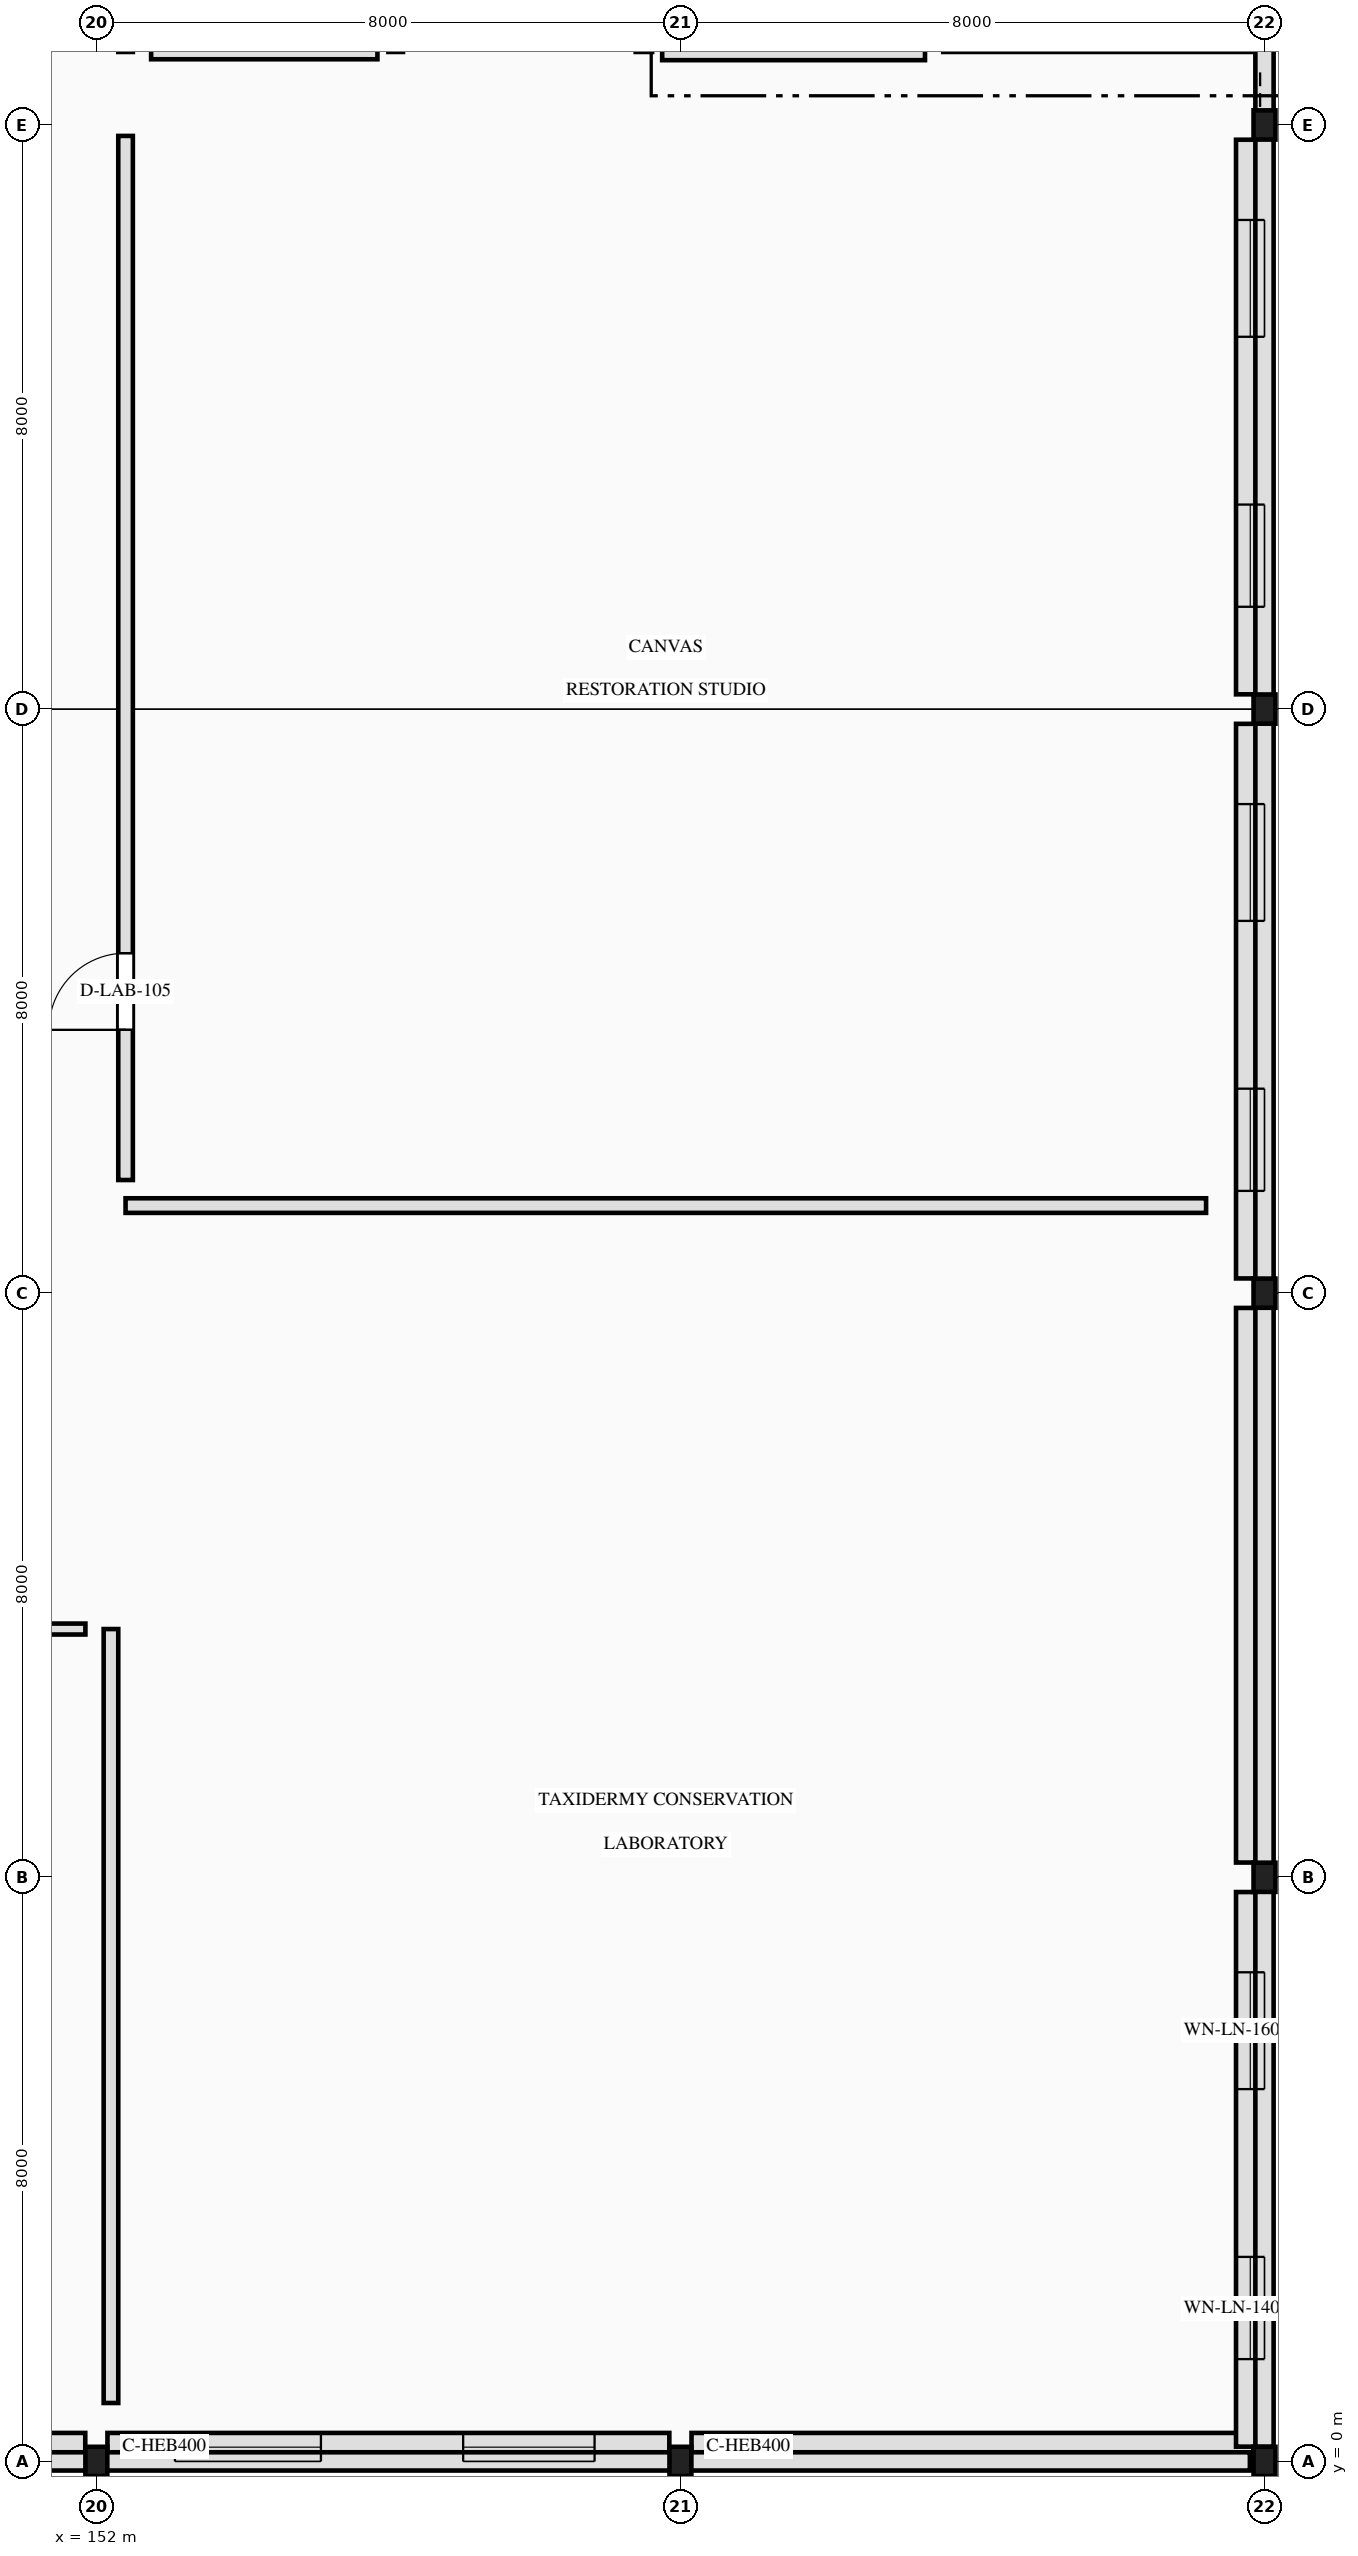
"""IFC4 building model, lengths in metres.
Left out: names, types, materials, properties, quantities, classifications, styles, units other than length and angle.
Written with IfcOpenShell. Run it as: python <this file> out.ifc"""

import sys

from ifc_helpers import new_model, si_unit, direction, frame, frame_2d, origin, origin_2d, place, context, subcontext, project, spatial, rectangle, i_section, extrude, element, fill, save


model = new_model("IFC4")
c1 = context("Model", 3, precision=1e-05, world=origin(), true_north=direction((0.0, 1.0)))
c2 = subcontext(c1, "Body", "Model", "MODEL_VIEW")
j1 = project(units=[si_unit("LENGTHUNIT", "METRE"), si_unit("PLANEANGLEUNIT", "RADIAN")], contexts=[c1])
p1 = place(None, origin())
s1 = spatial("IfcSite", under=j1, at=p1, CompositionType="ELEMENT")
p2 = place(p1, origin())
s2 = spatial("IfcBuilding", under=s1, at=p2, CompositionType="ELEMENT")
p3 = place(p2, frame((0.0, 0.0, 26.0)))
s3 = spatial("IfcBuildingStorey", under=s2, at=p3, CompositionType="ELEMENT", Elevation=26.0)
p4 = place(p3, frame((163.6, 33.15, 0.0), z_axis=(0.0, 0.0, 1.0), x_axis=(1.0, 0.0, 0.0)))
e1 = element("IfcWall", 1, at=p4, inside=s3, PredefinedType="SHEAR", context=c2, shape_type="SweptSolid", body=[
    extrude(rectangle(XDim=4.4, YDim=0.3, at=frame_2d((2.2, 0.0))), origin(), (0.0, 0.0, 1.0), 8.0),
])
p5 = place(p4, frame((1.3, 0.0, 0.0)))
e2 = element("IfcOpeningElement", 2, at=p5, cuts=e1, PredefinedType="OPENING", context=c2, shape_type="SweptSolid", body=[
    extrude(rectangle(XDim=1.8, YDim=2.2, at=frame_2d((0.9, 1.1))), frame((0.0, 0.16, 0.0), z_axis=(0.0, -1.0, 0.0), x_axis=(1.0, 0.0, 0.0)), (0.0, 0.0, 1.0), 0.32),
])
for number, where, z_axis, x_axis in (
    (3, (152.0, 0.0, 0.0), (0.0, 0.0, 1.0), (1.0, 0.0, 0.0)),
    (4, (160.0, 0.0, 0.0), (0.0, 0.0, 1.0), (1.0, 0.0, 0.0)),
    (5, (168.0, 0.0, 0.0), (0.0, 0.0, 1.0), (1.0, 0.0, 0.0)),
    (6, (168.0, 8.0, 0.0), (0.0, 0.0, 1.0), (1.0, 0.0, 0.0)),
    (7, (168.0, 16.0, 0.0), (0.0, 0.0, 1.0), (1.0, 0.0, 0.0)),
    (8, (168.0, 24.0, 0.0), (0.0, 0.0, 1.0), (1.0, 0.0, 0.0)),
    (9, (168.0, 32.0, 0.0), (0.0, 0.0, 1.0), (1.0, 0.0, 0.0)),
):
    element("IfcColumn", number, at=place(p3, frame(where, z_axis=z_axis, x_axis=x_axis)), inside=s3, PredefinedType="COLUMN", context=c2, shape_type="SweptSolid", body=[
        extrude(i_section(OverallWidth=0.3, OverallDepth=0.4, WebThickness=0.013, FlangeThickness=0.024, FilletRadius=0.027, at=origin_2d()), origin(), (0.0, 0.0, 1.0), 8.0),
    ])
p6 = place(p3, frame((151.848, 0.195, 0.0), z_axis=(0.0, 0.0, 1.0), x_axis=(-1.0, 0.0, 0.0)))
e10 = element("IfcWall", 10, at=p6, inside=s3, PredefinedType="SOLIDWALL", context=c2, shape_type="SweptSolid", body=[
    extrude(rectangle(XDim=7.696, YDim=0.39, at=frame_2d((3.848, 0.0))), origin(), (0.0, 0.0, 1.0), 7.495),
])
p7 = place(p6, frame((1.024, 0.0, 0.85)))
e11 = element("IfcOpeningElement", 11, at=p7, cuts=e10, PredefinedType="OPENING", context=c2, shape_type="SweptSolid", body=[
    extrude(rectangle(XDim=1.8, YDim=4.2, at=frame_2d((0.9, 2.1))), frame((0.0, 0.205, 0.0), z_axis=(0.0, -1.0, 0.0), x_axis=(1.0, 0.0, 0.0)), (0.0, 0.0, 1.0), 0.41),
])
p8 = place(p6, frame((4.772, 0.0, 0.85)))
e12 = element("IfcOpeningElement", 12, at=p8, cuts=e10, PredefinedType="OPENING", context=c2, shape_type="SweptSolid", body=[
    extrude(rectangle(XDim=2.0, YDim=4.6, at=frame_2d((1.0, 2.3))), frame((0.0, 0.205, 0.0), z_axis=(0.0, -1.0, 0.0), x_axis=(1.0, 0.0, 0.0)), (0.0, 0.0, 1.0), 0.41),
])
p9 = place(p3, frame((159.848, 0.195, 0.0), z_axis=(0.0, 0.0, 1.0), x_axis=(-1.0, 0.0, 0.0)))
e13 = element("IfcWall", 13, at=p9, inside=s3, PredefinedType="SOLIDWALL", context=c2, shape_type="SweptSolid", body=[
    extrude(rectangle(XDim=7.696, YDim=0.39, at=frame_2d((3.848, 0.0))), origin(), (0.0, 0.0, 1.0), 7.495),
])
p10 = place(p9, frame((1.024, 0.0, 0.85)))
e14 = element("IfcOpeningElement", 14, at=p10, cuts=e13, PredefinedType="OPENING", context=c2, shape_type="SweptSolid", body=[
    extrude(rectangle(XDim=1.8, YDim=4.2, at=frame_2d((0.9, 2.1))), frame((0.0, 0.205, 0.0), z_axis=(0.0, -1.0, 0.0), x_axis=(1.0, 0.0, 0.0)), (0.0, 0.0, 1.0), 0.41),
])
p11 = place(p9, frame((4.772, 0.0, 0.85)))
e15 = element("IfcOpeningElement", 15, at=p11, cuts=e13, PredefinedType="OPENING", context=c2, shape_type="SweptSolid", body=[
    extrude(rectangle(XDim=2.0, YDim=4.6, at=frame_2d((1.0, 2.3))), frame((0.0, 0.205, 0.0), z_axis=(0.0, -1.0, 0.0), x_axis=(1.0, 0.0, 0.0)), (0.0, 0.0, 1.0), 0.41),
])
p12 = place(p3, frame((167.848, 0.195, 0.0), z_axis=(0.0, 0.0, 1.0), x_axis=(-1.0, 0.0, 0.0)))
e16 = element("IfcWall", 16, at=p12, inside=s3, PredefinedType="SOLIDWALL", context=c2, shape_type="SweptSolid", body=[
    extrude(rectangle(XDim=7.696, YDim=0.39, at=frame_2d((3.848, 0.0))), origin(), (0.0, 0.0, 1.0), 7.495),
])
p13 = place(p3, frame((167.805, 7.798, 0.0), z_axis=(0.0, 0.0, 1.0), x_axis=(0.0, -1.0, 0.0)))
e17 = element("IfcWall", 17, at=p13, inside=s3, PredefinedType="SOLIDWALL", context=c2, shape_type="SweptSolid", body=[
    extrude(rectangle(XDim=7.596, YDim=0.39, at=frame_2d((3.798, 0.0))), origin(), (0.0, 0.0, 1.0), 7.495),
])
p14 = place(p13, frame((1.099, 0.0, 0.85)))
e18 = element("IfcOpeningElement", 18, at=p14, cuts=e17, PredefinedType="OPENING", context=c2, shape_type="SweptSolid", body=[
    extrude(rectangle(XDim=1.6, YDim=3.6, at=frame_2d((0.8, 1.8))), frame((0.0, 0.205, 0.0), z_axis=(0.0, -1.0, 0.0), x_axis=(1.0, 0.0, 0.0)), (0.0, 0.0, 1.0), 0.41),
])
p15 = place(p13, frame((4.997, 0.0, 0.85)))
e19 = element("IfcOpeningElement", 19, at=p15, cuts=e17, PredefinedType="OPENING", context=c2, shape_type="SweptSolid", body=[
    extrude(rectangle(XDim=1.4, YDim=3.4, at=frame_2d((0.7, 1.7))), frame((0.0, 0.205, 0.0), z_axis=(0.0, -1.0, 0.0), x_axis=(1.0, 0.0, 0.0)), (0.0, 0.0, 1.0), 0.41),
])
p16 = place(p3, frame((167.805, 15.798, 0.0), z_axis=(0.0, 0.0, 1.0), x_axis=(0.0, -1.0, 0.0)))
e20 = element("IfcWall", 20, at=p16, inside=s3, PredefinedType="SOLIDWALL", context=c2, shape_type="SweptSolid", body=[
    extrude(rectangle(XDim=7.596, YDim=0.39, at=frame_2d((3.798, 0.0))), origin(), (0.0, 0.0, 1.0), 7.495),
])
p17 = place(p3, frame((167.805, 23.798, 0.0), z_axis=(0.0, 0.0, 1.0), x_axis=(0.0, -1.0, 0.0)))
e21 = element("IfcWall", 21, at=p17, inside=s3, PredefinedType="SOLIDWALL", context=c2, shape_type="SweptSolid", body=[
    extrude(rectangle(XDim=7.596, YDim=0.39, at=frame_2d((3.798, 0.0))), origin(), (0.0, 0.0, 1.0), 7.495),
])
p18 = place(p17, frame((1.099, 0.0, 0.85)))
e22 = element("IfcOpeningElement", 22, at=p18, cuts=e21, PredefinedType="OPENING", context=c2, shape_type="SweptSolid", body=[
    extrude(rectangle(XDim=1.6, YDim=3.6, at=frame_2d((0.8, 1.8))), frame((0.0, 0.205, 0.0), z_axis=(0.0, -1.0, 0.0), x_axis=(1.0, 0.0, 0.0)), (0.0, 0.0, 1.0), 0.41),
])
p19 = place(p17, frame((4.997, 0.0, 0.85)))
e23 = element("IfcOpeningElement", 23, at=p19, cuts=e21, PredefinedType="OPENING", context=c2, shape_type="SweptSolid", body=[
    extrude(rectangle(XDim=1.4, YDim=3.4, at=frame_2d((0.7, 1.7))), frame((0.0, 0.205, 0.0), z_axis=(0.0, -1.0, 0.0), x_axis=(1.0, 0.0, 0.0)), (0.0, 0.0, 1.0), 0.41),
])
p20 = place(p3, frame((167.805, 31.798, 0.0), z_axis=(0.0, 0.0, 1.0), x_axis=(0.0, -1.0, 0.0)))
e24 = element("IfcWall", 24, at=p20, inside=s3, PredefinedType="SOLIDWALL", context=c2, shape_type="SweptSolid", body=[
    extrude(rectangle(XDim=7.596, YDim=0.39, at=frame_2d((3.798, 0.0))), origin(), (0.0, 0.0, 1.0), 7.495),
])
p21 = place(p20, frame((1.099, 0.0, 0.85)))
e25 = element("IfcOpeningElement", 25, at=p21, cuts=e24, PredefinedType="OPENING", context=c2, shape_type="SweptSolid", body=[
    extrude(rectangle(XDim=1.6, YDim=3.6, at=frame_2d((0.8, 1.8))), frame((0.0, 0.205, 0.0), z_axis=(0.0, -1.0, 0.0), x_axis=(1.0, 0.0, 0.0)), (0.0, 0.0, 1.0), 0.41),
])
p22 = place(p20, frame((4.997, 0.0, 0.85)))
e26 = element("IfcOpeningElement", 26, at=p22, cuts=e24, PredefinedType="OPENING", context=c2, shape_type="SweptSolid", body=[
    extrude(rectangle(XDim=1.4, YDim=3.4, at=frame_2d((0.7, 1.7))), frame((0.0, 0.205, 0.0), z_axis=(0.0, -1.0, 0.0), x_axis=(1.0, 0.0, 0.0)), (0.0, 0.0, 1.0), 0.41),
])
p23 = place(p3, frame((120.2, 0.0, 8.0), z_axis=(0.0, 0.0, 1.0), x_axis=(1.0, 0.0, 0.0)))
e27 = element("IfcWall", 27, at=p23, inside=s3, PredefinedType="PARAPET", context=c2, shape_type="SweptSolid", body=[
    extrude(rectangle(XDim=47.6, YDim=0.25, at=frame_2d((23.8, 0.0))), origin(), (0.0, 0.0, 1.0), 0.55),
])
p24 = place(p3, frame((168.0, 0.2, 8.0), z_axis=(0.0, 0.0, 1.0), x_axis=(0.0, 1.0, 0.0)))
e28 = element("IfcWall", 28, at=p24, inside=s3, PredefinedType="PARAPET", context=c2, shape_type="SweptSolid", body=[
    extrude(rectangle(XDim=45.6, YDim=0.25, at=frame_2d((22.8, 0.0))), origin(), (0.0, 0.0, 1.0), 0.55),
])
p25 = place(p3, frame((152.4, 33.0, 0.0), z_axis=(0.0, 0.0, 1.0), x_axis=(0.0, 1.0, 0.0)))
e29 = element("IfcWall", 29, at=p25, inside=s3, PredefinedType="PARTITIONING", context=c2, shape_type="SweptSolid", body=[
    extrude(rectangle(XDim=2.8, YDim=0.2, at=frame_2d((1.4, 0.0))), origin(), (0.0, 0.0, 1.0), 7.82),
])
p26 = place(p25, frame((0.3, 0.0, 0.0)))
e30 = element("IfcOpeningElement", 30, at=p26, cuts=e29, PredefinedType="OPENING", context=c2, shape_type="SweptSolid", body=[
    extrude(rectangle(XDim=1.9, YDim=2.35, at=frame_2d((0.95, 1.175))), frame((0.0, 0.11, 0.0), z_axis=(0.0, -1.0, 0.0), x_axis=(1.0, 0.0, 0.0)), (0.0, 0.0, 1.0), 0.22),
])
p27 = place(p3, frame((152.2, 0.8, 0.0), z_axis=(0.0, 0.0, 1.0), x_axis=(0.0, 1.0, 0.0)))
e31 = element("IfcWall", 31, at=p27, inside=s3, PredefinedType="PARTITIONING", context=c2, shape_type="SweptSolid", body=[
    extrude(rectangle(XDim=10.6, YDim=0.2, at=frame_2d((5.3, 0.0))), origin(), (0.0, 0.0, 1.0), 7.82),
])
p28 = place(p3, frame((152.4, 17.2, 0.0), z_axis=(0.0, 0.0, 1.0), x_axis=(1.0, 0.0, 0.0)))
e32 = element("IfcWall", 32, at=p28, inside=s3, PredefinedType="PARTITIONING", context=c2, shape_type="SweptSolid", body=[
    extrude(rectangle(XDim=14.8, YDim=0.2, at=frame_2d((7.4, 0.0))), origin(), (0.0, 0.0, 1.0), 7.82),
])
p29 = place(p3, frame((159.75, 33.0, 0.0), z_axis=(0.0, 0.0, 1.0), x_axis=(1.0, 0.0, 0.0)))
e33 = element("IfcWall", 33, at=p29, inside=s3, PredefinedType="SOLIDWALL", context=c2, shape_type="SweptSolid", body=[
    extrude(rectangle(XDim=3.6, YDim=0.225, at=frame_2d((1.8, 0.0))), origin(), (0.0, 0.0, 1.0), 7.82),
])
p30 = place(p3, frame((152.75, 33.0, 0.0), z_axis=(0.0, 0.0, 1.0), x_axis=(1.0, 0.0, 0.0)))
e34 = element("IfcWall", 34, at=p30, inside=s3, PredefinedType="PARTITIONING", context=c2, shape_type="SweptSolid", body=[
    extrude(rectangle(XDim=3.1, YDim=0.2, at=frame_2d((1.55, 0.0))), origin(), (0.0, 0.0, 1.0), 7.82),
])
p31 = place(p3, frame((128.95, 11.4, 0.0), z_axis=(0.0, 0.0, 1.0), x_axis=(1.0, 0.0, 0.0)))
e35 = element("IfcWall", 35, at=p31, inside=s3, PredefinedType="PARTITIONING", context=c2, shape_type="SweptSolid", body=[
    extrude(rectangle(XDim=22.9, YDim=0.15, at=frame_2d((11.45, 0.0))), origin(), (0.0, 0.0, 1.0), 7.82),
])
p32 = place(p3, frame((152.4, 17.55, 0.0), z_axis=(0.0, 0.0, 1.0), x_axis=(0.0, 1.0, 0.0)))
e36 = element("IfcWall", 36, at=p32, inside=s3, PredefinedType="PARTITIONING", context=c2, shape_type="SweptSolid", body=[
    extrude(rectangle(XDim=14.3, YDim=0.2, at=frame_2d((7.15, 0.0))), origin(), (0.0, 0.0, 1.0), 7.82),
])
p33 = place(p32, frame((2.057, 0.0, 0.0)))
e37 = element("IfcOpeningElement", 37, at=p33, cuts=e36, PredefinedType="OPENING", context=c2, shape_type="SweptSolid", body=[
    extrude(rectangle(XDim=1.05, YDim=2.25, at=frame_2d((0.525, 1.125))), frame((0.0, 0.11, 0.0), z_axis=(0.0, -1.0, 0.0), x_axis=(1.0, 0.0, 0.0)), (0.0, 0.0, 1.0), 0.22),
])
p34 = place(p10, origin())
e38 = element("IfcWindow", 38, at=p34, inside=s3, PartitioningType="DOUBLE_PANEL_VERTICAL", PredefinedType="WINDOW", context=c2, shape_type="SweptSolid", body=[
    extrude(rectangle(XDim=1.8, YDim=4.2, at=frame_2d((0.9, 2.1))), frame((0.0, 0.03, 0.0), z_axis=(0.0, -1.0, 0.0), x_axis=(1.0, 0.0, 0.0)), (0.0, 0.0, 1.0), 0.06),
])
fill(e14, e38)
p35 = place(p11, origin())
e39 = element("IfcWindow", 39, at=p35, inside=s3, PartitioningType="TRIPLE_PANEL_VERTICAL", PredefinedType="WINDOW", context=c2, shape_type="SweptSolid", body=[
    extrude(rectangle(XDim=2.0, YDim=4.6, at=frame_2d((1.0, 2.3))), frame((0.0, 0.03, 0.0), z_axis=(0.0, -1.0, 0.0), x_axis=(1.0, 0.0, 0.0)), (0.0, 0.0, 1.0), 0.06),
])
fill(e15, e39)
p36 = place(p14, origin())
e40 = element("IfcWindow", 40, at=p36, inside=s3, PartitioningType="DOUBLE_PANEL_VERTICAL", PredefinedType="WINDOW", context=c2, shape_type="SweptSolid", body=[
    extrude(rectangle(XDim=1.6, YDim=3.6, at=frame_2d((0.8, 1.8))), frame((0.0, 0.03, 0.0), z_axis=(0.0, -1.0, 0.0), x_axis=(1.0, 0.0, 0.0)), (0.0, 0.0, 1.0), 0.06),
])
fill(e18, e40)
p37 = place(p15, origin())
e41 = element("IfcWindow", 41, at=p37, inside=s3, PartitioningType="SINGLE_PANEL", PredefinedType="WINDOW", context=c2, shape_type="SweptSolid", body=[
    extrude(rectangle(XDim=1.4, YDim=3.4, at=frame_2d((0.7, 1.7))), frame((0.0, 0.03, 0.0), z_axis=(0.0, -1.0, 0.0), x_axis=(1.0, 0.0, 0.0)), (0.0, 0.0, 1.0), 0.06),
])
fill(e19, e41)
p38 = place(p18, origin())
e42 = element("IfcWindow", 42, at=p38, inside=s3, PartitioningType="DOUBLE_PANEL_VERTICAL", PredefinedType="WINDOW", context=c2, shape_type="SweptSolid", body=[
    extrude(rectangle(XDim=1.6, YDim=3.6, at=frame_2d((0.8, 1.8))), frame((0.0, 0.03, 0.0), z_axis=(0.0, -1.0, 0.0), x_axis=(1.0, 0.0, 0.0)), (0.0, 0.0, 1.0), 0.06),
])
fill(e22, e42)
p39 = place(p19, origin())
e43 = element("IfcWindow", 43, at=p39, inside=s3, PartitioningType="SINGLE_PANEL", PredefinedType="WINDOW", context=c2, shape_type="SweptSolid", body=[
    extrude(rectangle(XDim=1.4, YDim=3.4, at=frame_2d((0.7, 1.7))), frame((0.0, 0.03, 0.0), z_axis=(0.0, -1.0, 0.0), x_axis=(1.0, 0.0, 0.0)), (0.0, 0.0, 1.0), 0.06),
])
fill(e23, e43)
p40 = place(p21, origin())
e44 = element("IfcWindow", 44, at=p40, inside=s3, PartitioningType="DOUBLE_PANEL_VERTICAL", PredefinedType="WINDOW", context=c2, shape_type="SweptSolid", body=[
    extrude(rectangle(XDim=1.6, YDim=3.6, at=frame_2d((0.8, 1.8))), frame((0.0, 0.03, 0.0), z_axis=(0.0, -1.0, 0.0), x_axis=(1.0, 0.0, 0.0)), (0.0, 0.0, 1.0), 0.06),
])
fill(e25, e44)
p41 = place(p22, origin())
e45 = element("IfcWindow", 45, at=p41, inside=s3, PartitioningType="SINGLE_PANEL", PredefinedType="WINDOW", context=c2, shape_type="SweptSolid", body=[
    extrude(rectangle(XDim=1.4, YDim=3.4, at=frame_2d((0.7, 1.7))), frame((0.0, 0.03, 0.0), z_axis=(0.0, -1.0, 0.0), x_axis=(1.0, 0.0, 0.0)), (0.0, 0.0, 1.0), 0.06),
])
fill(e26, e45)
p42 = place(p33, origin())
e46 = element("IfcDoor", 46, at=p42, inside=s3, OperationType="SINGLE_SWING_LEFT", PredefinedType="DOOR", context=c2, shape_type="SweptSolid", body=[
    extrude(rectangle(XDim=1.05, YDim=2.25, at=frame_2d((0.525, 1.125))), frame((0.0, 0.025, 0.0), z_axis=(0.0, -1.0, 0.0), x_axis=(1.0, 0.0, 0.0)), (0.0, 0.0, 1.0), 0.05),
])
fill(e37, e46)
save(model, sys.argv[1])
